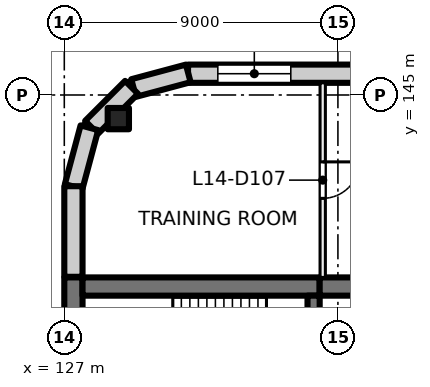
"""IFC4 building model, lengths in metres.
Left out: names, types, materials, properties, quantities, classifications, styles, units other than length and angle.
Written with IfcOpenShell. Run it as: python <this file> out.ifc"""

import sys

from ifc_helpers import new_model, si_unit, direction, frame, frame_2d, origin, origin_2d, place, context, subcontext, project, spatial, rectangle, extrude, element, fill, save


model = new_model("IFC4")
c1 = context("Model", 3, precision=1e-05, world=origin(), true_north=direction((0.0, 1.0)))
c2 = subcontext(c1, "Body", "Model", "MODEL_VIEW")
j1 = project(units=[si_unit("LENGTHUNIT", "METRE"), si_unit("PLANEANGLEUNIT", "RADIAN")], contexts=[c1])
p1 = place(None, origin())
s1 = spatial("IfcSite", under=j1, at=p1, CompositionType="ELEMENT")
p2 = place(p1, origin())
s2 = spatial("IfcBuilding", under=s1, at=p2, CompositionType="ELEMENT")
p3 = place(p2, frame((0.0, 0.0, 63.5)))
s3 = spatial("IfcBuildingStorey", under=s2, at=p3, CompositionType="ELEMENT", Elevation=63.5)
p4 = place(p3, frame((128.777, 144.223, 0.0), z_axis=(0.0, 0.0, 1.0), x_axis=(1.0, 0.0, 0.0)))
e1 = element("IfcColumn", 1, at=p4, inside=s3, PredefinedType="COLUMN", context=c2, shape_type="SweptSolid", body=[
    extrude(rectangle(XDim=0.7, YDim=0.7, at=origin_2d()), origin(), (0.0, 0.0, 1.0), 4.0),
])
p5 = place(p3, frame((127.3, 135.2, 0.0), z_axis=(0.0, 0.0, 1.0), x_axis=(0.0, 1.0, 0.0)))
e2 = element("IfcWall", 2, at=p5, inside=s3, PredefinedType="SHEAR", context=c2, shape_type="SweptSolid", body=[
    extrude(rectangle(XDim=3.8, YDim=0.6, at=frame_2d((1.9, 0.0))), origin(), (0.0, 0.0, 1.0), 4.0),
])
p6 = place(p3, frame((127.6, 138.7, 0.0), z_axis=(0.0, 0.0, 1.0), x_axis=(1.0, 0.0, 0.0)))
e3 = element("IfcWall", 3, at=p6, inside=s3, PredefinedType="SHEAR", context=c2, shape_type="SweptSolid", body=[
    extrude(rectangle(XDim=7.8, YDim=0.6, at=frame_2d((3.9, 0.0))), origin(), (0.0, 0.0, 1.0), 4.0),
])
p7 = place(p3, frame((135.4, 138.7, 0.0), z_axis=(0.0, 0.0, 1.0), x_axis=(1.0, 0.0, 0.0)))
e4 = element("IfcWall", 4, at=p7, inside=s3, PredefinedType="SHEAR", context=c2, shape_type="SweptSolid", body=[
    extrude(rectangle(XDim=4.6, YDim=0.6, at=frame_2d((2.3, 0.0))), origin(), (0.0, 0.0, 1.0), 4.0),
])
p8 = place(p3, frame((135.2, 135.6, 0.0), z_axis=(0.0, 0.0, 1.0), x_axis=(0.0, 1.0, 0.0)))
e5 = element("IfcWall", 5, at=p8, inside=s3, PredefinedType="SHEAR", context=c2, shape_type="SweptSolid", body=[
    extrude(rectangle(XDim=2.8, YDim=0.4, at=frame_2d((1.4, 0.0))), origin(), (0.0, 0.0, 1.0), 4.0),
])
p9 = place(p8, frame((0.9, 0.0, 0.0)))
e6 = element("IfcOpeningElement", 6, at=p9, cuts=e5, PredefinedType="OPENING", context=c2, shape_type="SweptSolid", body=[
    extrude(rectangle(XDim=1.0, YDim=2.1, at=frame_2d((0.5, 1.05))), frame((0.0, 0.21, 0.0), z_axis=(0.0, -1.0, 0.0), x_axis=(1.0, 0.0, 0.0)), (0.0, 0.0, 1.0), 0.42),
])
p10 = place(p3, frame((131.07, 145.7, 0.0), z_axis=(0.0, 0.0, 1.0), x_axis=(1.0, 0.0, 0.0)))
e7 = element("IfcWall", 7, at=p10, inside=s3, PredefinedType="SOLIDWALL", context=c2, shape_type="SweptSolid", body=[
    extrude(rectangle(XDim=31.93, YDim=0.6, at=frame_2d((15.965, 0.0))), origin(), (0.0, 0.0, 1.0), 3.625),
])
p11 = place(p10, frame((0.98, 0.0, 0.9)))
e8 = element("IfcOpeningElement", 8, at=p11, cuts=e7, PredefinedType="OPENING", context=c2, shape_type="SweptSolid", body=[
    extrude(rectangle(XDim=2.4, YDim=2.4, at=frame_2d((1.2, 1.2))), frame((0.0, 0.31, 0.0), z_axis=(0.0, -1.0, 0.0), x_axis=(1.0, 0.0, 0.0)), (0.0, 0.0, 1.0), 0.62),
])
p12 = place(p10, frame((5.48, 0.0, 0.9)))
e9 = element("IfcOpeningElement", 9, at=p12, cuts=e7, PredefinedType="OPENING", context=c2, shape_type="SweptSolid", body=[
    extrude(rectangle(XDim=2.4, YDim=2.4, at=frame_2d((1.2, 1.2))), frame((0.0, 0.31, 0.0), z_axis=(0.0, -1.0, 0.0), x_axis=(1.0, 0.0, 0.0)), (0.0, 0.0, 1.0), 0.62),
])
p13 = place(p10, frame((9.98, 0.0, 0.9)))
e10 = element("IfcOpeningElement", 10, at=p13, cuts=e7, PredefinedType="OPENING", context=c2, shape_type="SweptSolid", body=[
    extrude(rectangle(XDim=2.4, YDim=2.4, at=frame_2d((1.2, 1.2))), frame((0.0, 0.31, 0.0), z_axis=(0.0, -1.0, 0.0), x_axis=(1.0, 0.0, 0.0)), (0.0, 0.0, 1.0), 0.62),
])
p14 = place(p10, frame((14.48, 0.0, 0.9)))
e11 = element("IfcOpeningElement", 11, at=p14, cuts=e7, PredefinedType="OPENING", context=c2, shape_type="SweptSolid", body=[
    extrude(rectangle(XDim=2.4, YDim=2.4, at=frame_2d((1.2, 1.2))), frame((0.0, 0.31, 0.0), z_axis=(0.0, -1.0, 0.0), x_axis=(1.0, 0.0, 0.0)), (0.0, 0.0, 1.0), 0.62),
])
p15 = place(p10, frame((18.98, 0.0, 0.9)))
e12 = element("IfcOpeningElement", 12, at=p15, cuts=e7, PredefinedType="OPENING", context=c2, shape_type="SweptSolid", body=[
    extrude(rectangle(XDim=2.4, YDim=2.4, at=frame_2d((1.2, 1.2))), frame((0.0, 0.31, 0.0), z_axis=(0.0, -1.0, 0.0), x_axis=(1.0, 0.0, 0.0)), (0.0, 0.0, 1.0), 0.62),
])
p16 = place(p10, frame((23.48, 0.0, 0.9)))
e13 = element("IfcOpeningElement", 13, at=p16, cuts=e7, PredefinedType="OPENING", context=c2, shape_type="SweptSolid", body=[
    extrude(rectangle(XDim=2.4, YDim=2.4, at=frame_2d((1.2, 1.2))), frame((0.0, 0.31, 0.0), z_axis=(0.0, -1.0, 0.0), x_axis=(1.0, 0.0, 0.0)), (0.0, 0.0, 1.0), 0.62),
])
p17 = place(p10, frame((27.98, 0.0, 0.9)))
e14 = element("IfcOpeningElement", 14, at=p17, cuts=e7, PredefinedType="OPENING", context=c2, shape_type="SweptSolid", body=[
    extrude(rectangle(XDim=2.4, YDim=2.4, at=frame_2d((1.2, 1.2))), frame((0.0, 0.31, 0.0), z_axis=(0.0, -1.0, 0.0), x_axis=(1.0, 0.0, 0.0)), (0.0, 0.0, 1.0), 0.62),
])
for number, where, z_axis, x_axis in (
    (15, (129.281, 145.229, 0.0), (0.0, 0.0, 1.0), (0.966, 0.259, 0.0)),
    (16, (127.896, 143.936, 0.0), (0.0, 0.0, 1.0), (0.707, 0.707, 0.0)),
):
    element("IfcWall", number, at=place(p3, frame(where, z_axis=z_axis, x_axis=x_axis)), inside=s3, PredefinedType="SOLIDWALL", context=c2, shape_type="SweptSolid", body=[
        extrude(rectangle(XDim=1.861, YDim=0.6, at=frame_2d((0.93, 0.0))), origin(), (0.0, 0.0, 1.0), 3.625),
    ])
p18 = place(p3, frame((127.308, 141.99, 0.0), z_axis=(0.0, 0.0, 1.0), x_axis=(0.258839784042, 0.965920269068, 0.0)))
e17 = element("IfcWall", 17, at=p18, inside=s3, PredefinedType="SOLIDWALL", context=c2, shape_type="SweptSolid", body=[
    extrude(rectangle(XDim=2.0, YDim=0.6, at=frame_2d((1.0, 0.0))), origin(), (0.0, 0.0, 1.0), 3.625),
])
p19 = place(p3, frame((127.3, 139.02, 0.0), z_axis=(0.0, 0.0, 1.0), x_axis=(0.0, 1.0, 0.0)))
e18 = element("IfcWall", 18, at=p19, inside=s3, PredefinedType="SOLIDWALL", context=c2, shape_type="SweptSolid", body=[
    extrude(rectangle(XDim=2.98, YDim=0.6, at=frame_2d((1.49, 0.0))), origin(), (0.0, 0.0, 1.0), 3.625),
])
p20 = place(p3, frame((135.5, 145.4, 0.0), z_axis=(0.0, 0.0, 1.0), x_axis=(0.0, -1.0, 0.0)))
e19 = element("IfcWall", 19, at=p20, inside=s3, PredefinedType="PARTITIONING", context=c2, shape_type="SweptSolid", body=[
    extrude(rectangle(XDim=6.4, YDim=0.175, at=frame_2d((3.2, 0.0))), origin(), (0.0, 0.0, 1.0), 3.625),
])
p21 = place(p20, frame((2.6, 0.0, 0.0)))
e20 = element("IfcOpeningElement", 20, at=p21, cuts=e19, PredefinedType="OPENING", context=c2, shape_type="SweptSolid", body=[
    extrude(rectangle(XDim=1.2, YDim=2.1, at=frame_2d((0.6, 1.05))), frame((0.0, 0.097, 0.0), z_axis=(0.0, -1.0, 0.0), x_axis=(1.0, 0.0, 0.0)), (0.0, 0.0, 1.0), 0.195),
])
p22 = place(p11, origin())
e21 = element("IfcWindow", 21, at=p22, inside=s3, PartitioningType="SINGLE_PANEL", PredefinedType="WINDOW", context=c2, shape_type="SweptSolid", body=[
    extrude(rectangle(XDim=2.4, YDim=2.4, at=frame_2d((1.2, 1.2))), frame((0.0, 0.03, 0.0), z_axis=(0.0, -1.0, 0.0), x_axis=(1.0, 0.0, 0.0)), (0.0, 0.0, 1.0), 0.06),
])
fill(e8, e21)
p23 = place(p21, origin())
e22 = element("IfcDoor", 22, at=p23, inside=s3, OperationType="DOUBLE_DOOR_SINGLE_SWING", PredefinedType="DOOR", context=c2, shape_type="SweptSolid", body=[
    extrude(rectangle(XDim=1.2, YDim=2.1, at=frame_2d((0.6, 1.05))), frame((0.0, 0.025, 0.0), z_axis=(0.0, -1.0, 0.0), x_axis=(1.0, 0.0, 0.0)), (0.0, 0.0, 1.0), 0.05),
])
fill(e20, e22)
save(model, sys.argv[1])
